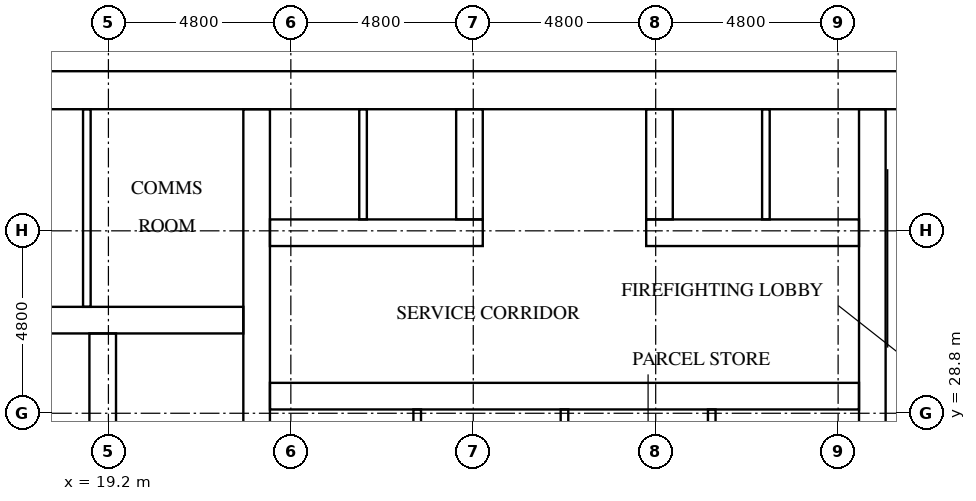
"""IFC4 building model, lengths in metres.
Left out: names, types, materials, properties, quantities, classifications, styles, units other than length and angle.
Written with IfcOpenShell. Run it as: python <this file> out.ifc"""

import sys

from ifc_helpers import new_model, si_unit, direction, frame, frame_2d, origin, place, context, subcontext, project, spatial, rectangle, extrude, element, fill, save


model = new_model("IFC4")
c1 = context("Model", 3, precision=1e-05, world=origin(), true_north=direction((0.0, 1.0)))
c2 = subcontext(c1, "Body", "Model", "MODEL_VIEW")
j1 = project(units=[si_unit("LENGTHUNIT", "METRE"), si_unit("PLANEANGLEUNIT", "RADIAN")], contexts=[c1])
p1 = place(None, origin())
s1 = spatial("IfcSite", under=j1, at=p1, CompositionType="ELEMENT")
p2 = place(p1, origin())
s2 = spatial("IfcBuilding", under=s1, at=p2, CompositionType="ELEMENT")
p3 = place(p2, frame((0.0, 0.0, 24.0)))
s3 = spatial("IfcBuildingStorey", under=s2, at=p3, CompositionType="ELEMENT", Elevation=24.0)
p4 = place(p3, frame((15.0, 37.3, 0.0), z_axis=(0.0, 0.0, 1.0), x_axis=(1.0, 0.0, 0.0)))
e1 = element("IfcWall", 1, at=p4, inside=s3, PredefinedType="SHEAR", context=c2, shape_type="SweptSolid", body=[
    extrude(rectangle(XDim=32.4, YDim=1.0, at=frame_2d((16.2, 0.0))), origin(), (0.0, 0.0, 1.0), 5.1),
])
p5 = place(p4, frame((15.3, 0.0, 0.0)))
e2 = element("IfcOpeningElement", 2, at=p5, cuts=e1, PredefinedType="OPENING", context=c2, shape_type="SweptSolid", body=[
    extrude(rectangle(XDim=1.8, YDim=2.1, at=frame_2d((0.9, 1.05))), frame((0.0, 0.51, 0.0), z_axis=(0.0, -1.0, 0.0), x_axis=(1.0, 0.0, 0.0)), (0.0, 0.0, 1.0), 1.02),
])
p6 = place(p4, frame((1.766, 0.0, 0.0)))
e3 = element("IfcOpeningElement", 3, at=p6, cuts=e1, PredefinedType="OPENING", context=c2, shape_type="SweptSolid", body=[
    extrude(rectangle(XDim=1.0, YDim=2.1, at=frame_2d((0.5, 1.05))), frame((0.0, 0.51, 0.0), z_axis=(0.0, -1.0, 0.0), x_axis=(1.0, 0.0, 0.0)), (0.0, 0.0, 1.0), 1.02),
])
p7 = place(p4, frame((5.241, 0.0, 0.0)))
e4 = element("IfcOpeningElement", 4, at=p7, cuts=e1, PredefinedType="OPENING", context=c2, shape_type="SweptSolid", body=[
    extrude(rectangle(XDim=1.0, YDim=2.1, at=frame_2d((0.5, 1.05))), frame((0.0, 0.51, 0.0), z_axis=(0.0, -1.0, 0.0), x_axis=(1.0, 0.0, 0.0)), (0.0, 0.0, 1.0), 1.02),
])
p8 = place(p3, frame((19.05, 16.0, 0.0), z_axis=(0.0, 0.0, 1.0), x_axis=(0.0, 1.0, 0.0)))
e5 = element("IfcWall", 5, at=p8, inside=s3, PredefinedType="SHEAR", context=c2, shape_type="SweptSolid", body=[
    extrude(rectangle(XDim=14.9, YDim=0.7, at=frame_2d((7.45, 0.0))), origin(), (0.0, 0.0, 1.0), 5.1),
])
p9 = place(p8, frame((9.45, 0.0, 0.0)))
e6 = element("IfcOpeningElement", 6, at=p9, cuts=e5, PredefinedType="OPENING", context=c2, shape_type="SweptSolid", body=[
    extrude(rectangle(XDim=1.1, YDim=2.1, at=frame_2d((0.55, 1.05))), frame((0.0, 0.36, 0.0), z_axis=(0.0, -1.0, 0.0), x_axis=(1.0, 0.0, 0.0)), (0.0, 0.0, 1.0), 0.72),
])
p10 = place(p8, frame((12.95, 0.0, 0.0)))
e7 = element("IfcOpeningElement", 7, at=p10, cuts=e5, PredefinedType="OPENING", context=c2, shape_type="SweptSolid", body=[
    extrude(rectangle(XDim=1.1, YDim=2.1, at=frame_2d((0.55, 1.05))), frame((0.0, 0.36, 0.0), z_axis=(0.0, -1.0, 0.0), x_axis=(1.0, 0.0, 0.0)), (0.0, 0.0, 1.0), 0.72),
])
p11 = place(p8, frame((0.2, 0.0, 0.0)))
e8 = element("IfcOpeningElement", 8, at=p11, cuts=e5, PredefinedType="OPENING", context=c2, shape_type="SweptSolid", body=[
    extrude(rectangle(XDim=1.2, YDim=2.1, at=frame_2d((0.6, 1.05))), frame((0.0, 0.36, 0.0), z_axis=(0.0, -1.0, 0.0), x_axis=(1.0, 0.0, 0.0)), (0.0, 0.0, 1.0), 0.72),
])
p12 = place(p3, frame((23.1, 16.0, 0.0), z_axis=(0.0, 0.0, 1.0), x_axis=(0.0, 1.0, 0.0)))
e9 = element("IfcWall", 9, at=p12, inside=s3, PredefinedType="SHEAR", context=c2, shape_type="SweptSolid", body=[
    extrude(rectangle(XDim=20.8, YDim=0.7, at=frame_2d((10.4, 0.0))), origin(), (0.0, 0.0, 1.0), 5.1),
])
p13 = place(p3, frame((39.3, 27.75, 0.0), z_axis=(0.0, 0.0, 1.0), x_axis=(0.0, 1.0, 0.0)))
e10 = element("IfcWall", 10, at=p13, inside=s3, PredefinedType="SHEAR", context=c2, shape_type="SweptSolid", body=[
    extrude(rectangle(XDim=9.05, YDim=0.7, at=frame_2d((4.525, 0.0))), origin(), (0.0, 0.0, 1.0), 5.1),
])
p14 = place(p3, frame((16.0, 31.25, 0.0), z_axis=(0.0, 0.0, 1.0), x_axis=(1.0, 0.0, 0.0)))
e11 = element("IfcWall", 11, at=p14, inside=s3, PredefinedType="SHEAR", context=c2, shape_type="SweptSolid", body=[
    extrude(rectangle(XDim=6.75, YDim=0.7, at=frame_2d((3.375, 0.0))), origin(), (0.0, 0.0, 1.0), 5.1),
])
p15 = place(p3, frame((23.45, 29.25, 0.0), z_axis=(0.0, 0.0, 1.0), x_axis=(1.0, 0.0, 0.0)))
e12 = element("IfcWall", 12, at=p15, inside=s3, PredefinedType="SHEAR", context=c2, shape_type="SweptSolid", body=[
    extrude(rectangle(XDim=15.5, YDim=0.7, at=frame_2d((7.75, 0.0))), origin(), (0.0, 0.0, 1.0), 5.1),
])
p16 = place(p15, frame((1.387, 0.0, 0.0)))
e13 = element("IfcOpeningElement", 13, at=p16, cuts=e12, PredefinedType="OPENING", context=c2, shape_type="SweptSolid", body=[
    extrude(rectangle(XDim=1.0, YDim=2.1, at=frame_2d((0.5, 1.05))), frame((0.0, 0.36, 0.0), z_axis=(0.0, -1.0, 0.0), x_axis=(1.0, 0.0, 0.0)), (0.0, 0.0, 1.0), 0.72),
])
p17 = place(p15, frame((5.312, 0.0, 0.0)))
e14 = element("IfcOpeningElement", 14, at=p17, cuts=e12, PredefinedType="OPENING", context=c2, shape_type="SweptSolid", body=[
    extrude(rectangle(XDim=1.0, YDim=2.1, at=frame_2d((0.5, 1.05))), frame((0.0, 0.36, 0.0), z_axis=(0.0, -1.0, 0.0), x_axis=(1.0, 0.0, 0.0)), (0.0, 0.0, 1.0), 0.72),
])
p18 = place(p15, frame((9.188, 0.0, 0.0)))
e15 = element("IfcOpeningElement", 15, at=p18, cuts=e12, PredefinedType="OPENING", context=c2, shape_type="SweptSolid", body=[
    extrude(rectangle(XDim=1.0, YDim=2.1, at=frame_2d((0.5, 1.05))), frame((0.0, 0.36, 0.0), z_axis=(0.0, -1.0, 0.0), x_axis=(1.0, 0.0, 0.0)), (0.0, 0.0, 1.0), 0.72),
])
p19 = place(p15, frame((13.113, 0.0, 0.0)))
e16 = element("IfcOpeningElement", 16, at=p19, cuts=e12, PredefinedType="OPENING", context=c2, shape_type="SweptSolid", body=[
    extrude(rectangle(XDim=1.0, YDim=2.1, at=frame_2d((0.5, 1.05))), frame((0.0, 0.36, 0.0), z_axis=(0.0, -1.0, 0.0), x_axis=(1.0, 0.0, 0.0)), (0.0, 0.0, 1.0), 0.72),
])
p20 = place(p3, frame((23.45, 33.55, 0.0), z_axis=(0.0, 0.0, 1.0), x_axis=(1.0, 0.0, 0.0)))
e17 = element("IfcWall", 17, at=p20, inside=s3, PredefinedType="SHEAR", context=c2, shape_type="SweptSolid", body=[
    extrude(rectangle(XDim=5.6, YDim=0.7, at=frame_2d((2.8, 0.0))), origin(), (0.0, 0.0, 1.0), 5.1),
])
p21 = place(p3, frame((33.35, 33.55, 0.0), z_axis=(0.0, 0.0, 1.0), x_axis=(1.0, 0.0, 0.0)))
e18 = element("IfcWall", 18, at=p21, inside=s3, PredefinedType="SHEAR", context=c2, shape_type="SweptSolid", body=[
    extrude(rectangle(XDim=5.6, YDim=0.7, at=frame_2d((2.8, 0.0))), origin(), (0.0, 0.0, 1.0), 5.1),
])
for number, where, z_axis, x_axis in (
    (19, (28.7, 33.9, 0.0), (0.0, 0.0, 1.0), (0.0, 1.0, 0.0)),
    (20, (33.7, 33.9, 0.0), (0.0, 0.0, 1.0), (0.0, 1.0, 0.0)),
):
    element("IfcWall", number, at=place(p3, frame(where, z_axis=z_axis, x_axis=x_axis)), inside=s3, PredefinedType="SHEAR", context=c2, shape_type="SweptSolid", body=[
        extrude(rectangle(XDim=2.9, YDim=0.7, at=frame_2d((1.45, 0.0))), origin(), (0.0, 0.0, 1.0), 5.1),
    ])
for number, where, z_axis, x_axis in (
    (21, (25.9, 33.9, 0.0), (0.0, 0.0, 1.0), (0.0, 1.0, 0.0)),
    (22, (36.5, 33.9, 0.0), (0.0, 0.0, 1.0), (0.0, 1.0, 0.0)),
):
    element("IfcWall", number, at=place(p3, frame(where, z_axis=z_axis, x_axis=x_axis)), inside=s3, PredefinedType="SOLIDWALL", context=c2, shape_type="SweptSolid", body=[
        extrude(rectangle(XDim=2.9, YDim=0.2, at=frame_2d((1.45, 0.0))), origin(), (0.0, 0.0, 1.0), 5.1),
    ])
p22 = place(p3, frame((18.633, 31.6, 0.0), z_axis=(0.0, 0.0, 1.0), x_axis=(0.0, 1.0, 0.0)))
e23 = element("IfcWall", 23, at=p22, inside=s3, PredefinedType="PARTITIONING", context=c2, shape_type="SweptSolid", body=[
    extrude(rectangle(XDim=5.2, YDim=0.2, at=frame_2d((2.6, 0.0))), origin(), (0.0, 0.0, 1.0), 5.1),
])
for number, where, z_axis, x_axis in (
    (24, (27.325, 26.5, 0.0), (0.0, 0.0, 1.0), (0.0, 1.0, 0.0)),
    (25, (31.2, 26.5, 0.0), (0.0, 0.0, 1.0), (0.0, 1.0, 0.0)),
    (26, (35.075, 26.5, 0.0), (0.0, 0.0, 1.0), (0.0, 1.0, 0.0)),
):
    element("IfcWall", number, at=place(p3, frame(where, z_axis=z_axis, x_axis=x_axis)), inside=s3, PredefinedType="PARTITIONING", context=c2, shape_type="SweptSolid", body=[
        extrude(rectangle(XDim=2.4, YDim=0.2, at=frame_2d((1.2, 0.0))), origin(), (0.0, 0.0, 1.0), 5.1),
    ])
p23 = place(p10, origin())
e27 = element("IfcDoor", 27, at=p23, inside=s3, OperationType="DOUBLE_DOOR_SLIDING", PredefinedType="DOOR", context=c2, shape_type="SweptSolid", body=[
    extrude(rectangle(XDim=1.1, YDim=2.1, at=frame_2d((0.55, 1.05))), frame((0.0, 0.025, 0.0), z_axis=(0.0, -1.0, 0.0), x_axis=(1.0, 0.0, 0.0)), (0.0, 0.0, 1.0), 0.05),
])
fill(e7, e27)
p24 = place(p5, origin())
e28 = element("IfcDoor", 28, at=p24, inside=s3, OperationType="DOUBLE_DOOR_SINGLE_SWING", PredefinedType="DOOR", context=c2, shape_type="SweptSolid", body=[
    extrude(rectangle(XDim=1.8, YDim=2.1, at=frame_2d((0.9, 1.05))), frame((0.0, 0.025, 0.0), z_axis=(0.0, -1.0, 0.0), x_axis=(1.0, 0.0, 0.0)), (0.0, 0.0, 1.0), 0.05),
])
fill(e2, e28)
p25 = place(p6, origin())
e29 = element("IfcDoor", 29, at=p25, inside=s3, OperationType="SINGLE_SWING_RIGHT", PredefinedType="DOOR", context=c2, shape_type="SweptSolid", body=[
    extrude(rectangle(XDim=1.0, YDim=2.1, at=frame_2d((0.5, 1.05))), frame((0.0, 0.025, 0.0), z_axis=(0.0, -1.0, 0.0), x_axis=(1.0, 0.0, 0.0)), (0.0, 0.0, 1.0), 0.05),
])
fill(e3, e29)
p26 = place(p7, origin())
e30 = element("IfcDoor", 30, at=p26, inside=s3, OperationType="SINGLE_SWING_LEFT", PredefinedType="DOOR", context=c2, shape_type="SweptSolid", body=[
    extrude(rectangle(XDim=1.0, YDim=2.1, at=frame_2d((0.5, 1.05))), frame((0.0, 0.025, 0.0), z_axis=(0.0, -1.0, 0.0), x_axis=(1.0, 0.0, 0.0)), (0.0, 0.0, 1.0), 0.05),
])
fill(e4, e30)
p27 = place(p16, origin())
e31 = element("IfcDoor", 31, at=p27, inside=s3, OperationType="SINGLE_SWING_RIGHT", PredefinedType="DOOR", context=c2, shape_type="SweptSolid", body=[
    extrude(rectangle(XDim=1.0, YDim=2.1, at=frame_2d((0.5, 1.05))), frame((0.0, 0.025, 0.0), z_axis=(0.0, -1.0, 0.0), x_axis=(1.0, 0.0, 0.0)), (0.0, 0.0, 1.0), 0.05),
])
fill(e13, e31)
p28 = place(p17, origin())
e32 = element("IfcDoor", 32, at=p28, inside=s3, OperationType="SINGLE_SWING_LEFT", PredefinedType="DOOR", context=c2, shape_type="SweptSolid", body=[
    extrude(rectangle(XDim=1.0, YDim=2.1, at=frame_2d((0.5, 1.05))), frame((0.0, 0.025, 0.0), z_axis=(0.0, -1.0, 0.0), x_axis=(1.0, 0.0, 0.0)), (0.0, 0.0, 1.0), 0.05),
])
fill(e14, e32)
p29 = place(p18, origin())
e33 = element("IfcDoor", 33, at=p29, inside=s3, OperationType="SINGLE_SWING_RIGHT", PredefinedType="DOOR", context=c2, shape_type="SweptSolid", body=[
    extrude(rectangle(XDim=1.0, YDim=2.1, at=frame_2d((0.5, 1.05))), frame((0.0, 0.025, 0.0), z_axis=(0.0, -1.0, 0.0), x_axis=(1.0, 0.0, 0.0)), (0.0, 0.0, 1.0), 0.05),
])
fill(e15, e33)
p30 = place(p19, origin())
e34 = element("IfcDoor", 34, at=p30, inside=s3, OperationType="SINGLE_SWING_LEFT", PredefinedType="DOOR", context=c2, shape_type="SweptSolid", body=[
    extrude(rectangle(XDim=1.0, YDim=2.1, at=frame_2d((0.5, 1.05))), frame((0.0, 0.025, 0.0), z_axis=(0.0, -1.0, 0.0), x_axis=(1.0, 0.0, 0.0)), (0.0, 0.0, 1.0), 0.05),
])
fill(e16, e34)
save(model, sys.argv[1])
